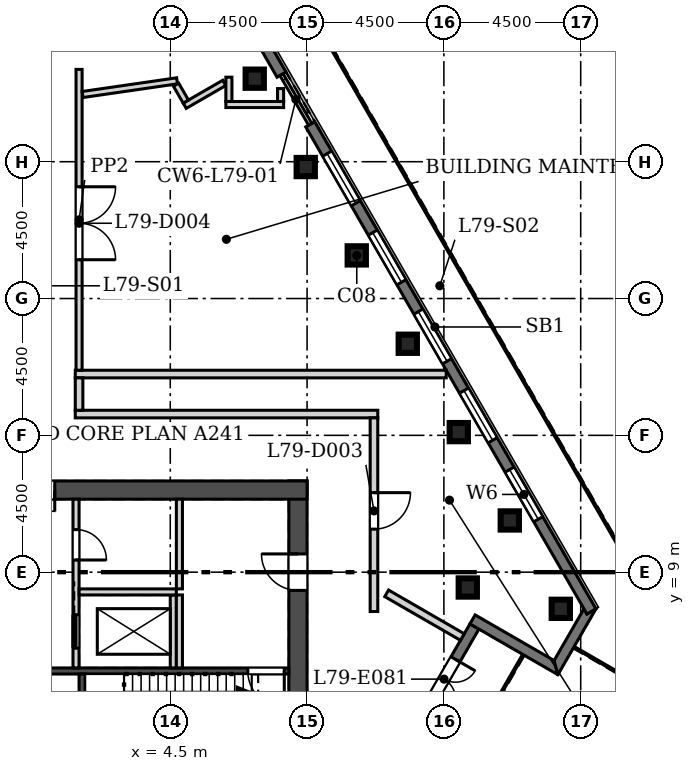
"""IFC4 building model, lengths in metres.
Left out: names, types, materials, properties, quantities, classifications, styles, units other than length and angle.
Written with IfcOpenShell. Run it as: python <this file> out.ifc"""

import sys

from ifc_helpers import new_model, si_unit, direction, frame, frame_2d, origin, origin_2d, place, context, subcontext, project, spatial, polyline, rectangle, hollow_rectangle, outline, extrude, element, fill, save


model = new_model("IFC4")
c1 = context("Model", 3, precision=1e-05, world=origin(), true_north=direction((0.0, 1.0)))
c2 = subcontext(c1, "Body", "Model", "MODEL_VIEW")
j1 = project(units=[si_unit("LENGTHUNIT", "METRE"), si_unit("PLANEANGLEUNIT", "RADIAN")], contexts=[c1])
p1 = place(None, origin())
s1 = spatial("IfcSite", under=j1, at=p1, CompositionType="ELEMENT")
p2 = place(p1, origin())
s2 = spatial("IfcBuilding", under=s1, at=p2, CompositionType="ELEMENT")
p3 = place(p2, frame((0.0, 0.0, 350.1)))
s3 = spatial("IfcBuildingStorey", under=s2, at=p3, CompositionType="ELEMENT", Elevation=350.1)
for number, where, z_axis, x_axis in (
    (1, (14.286, 8.495, 0.0), (0.0, 0.0, 1.0), (1.0, 0.0, 0.0)),
    (2, (17.345, 7.794, 0.0), (0.0, 0.0, 1.0), (1.0, 0.0, 0.0)),
    (3, (15.667, 10.7, 0.0), (0.0, 0.0, 1.0), (1.0, 0.0, 0.0)),
    (4, (13.99, 13.606, 0.0), (0.0, 0.0, 1.0), (1.0, 0.0, 0.0)),
    (5, (12.312, 16.512, 0.0), (0.0, 0.0, 1.0), (1.0, 0.0, 0.0)),
    (6, (10.634, 19.419, 0.0), (0.0, 0.0, 1.0), (1.0, 0.0, 0.0)),
    (7, (8.956, 22.325, 0.0), (0.0, 0.0, 1.0), (1.0, 0.0, 0.0)),
    (8, (7.278, 25.231, 0.0), (0.0, 0.0, 1.0), (1.0, 0.0, 0.0)),
):
    element("IfcColumn", number, at=place(p3, frame(where, z_axis=z_axis, x_axis=x_axis)), inside=s3, PredefinedType="COLUMN", context=c2, shape_type="SweptSolid", body=[
        extrude(hollow_rectangle(XDim=0.6, YDim=0.6, WallThickness=0.03, at=origin_2d()), origin(), (0.0, 0.0, 1.0), 4.4),
    ])
p4 = place(p3, frame((8.7, 0.85, 0.0), z_axis=(0.0, 0.0, 1.0), x_axis=(0.0, 1.0, 0.0)))
e9 = element("IfcWall", 9, at=p4, inside=s3, PredefinedType="SHEAR", context=c2, shape_type="SweptSolid", body=[
    extrude(rectangle(XDim=11.15, YDim=0.6, at=frame_2d((5.575, 0.0))), origin(), (0.0, 0.0, 1.0), 5.0),
])
p5 = place(p4, frame((7.55, 0.0, 0.0)))
e10 = element("IfcOpeningElement", 10, at=p5, cuts=e9, PredefinedType="OPENING", context=c2, shape_type="SweptSolid", body=[
    extrude(rectangle(XDim=1.2, YDim=2.1, at=frame_2d((0.6, 1.05))), frame((0.0, 0.31, 0.0), z_axis=(0.0, -1.0, 0.0), x_axis=(1.0, 0.0, 0.0)), (0.0, 0.0, 1.0), 0.62),
])
p6 = place(p3, frame((9.0, 11.7, 0.0), z_axis=(0.0, 0.0, 1.0), x_axis=(-1.0, 0.0, 0.0)))
e11 = element("IfcWall", 11, at=p6, inside=s3, PredefinedType="SHEAR", context=c2, shape_type="SweptSolid", body=[
    extrude(rectangle(XDim=18.0, YDim=0.6, at=frame_2d((9.0, 0.0))), origin(), (0.0, 0.0, 1.0), 5.0),
])
p7 = place(p6, frame((8.3, 0.0, 0.0)))
e12 = element("IfcOpeningElement", 12, at=p7, cuts=e11, PredefinedType="OPENING", context=c2, shape_type="SweptSolid", body=[
    extrude(rectangle(XDim=1.4, YDim=2.1, at=frame_2d((0.7, 1.05))), frame((0.0, 0.31, 0.0), z_axis=(0.0, -1.0, 0.0), x_axis=(1.0, 0.0, 0.0)), (0.0, 0.0, 1.0), 0.62),
])
p8 = place(p3, frame((12.505, 3.75, 0.0), z_axis=(0.0, 0.0, 1.0), x_axis=(0.49999894854, 0.866026010844, 0.0)))
e13 = element("IfcWall", 13, at=p8, inside=s3, PredefinedType="SOLIDWALL", context=c2, shape_type="SweptSolid", body=[
    extrude(rectangle(XDim=4.0, YDim=0.34, at=frame_2d((2.0, 0.0))), origin(), (0.0, 0.0, 1.0), 4.4),
])
p9 = place(p8, frame((1.25, 0.0, 0.0)))
e14 = element("IfcOpeningElement", 14, at=p9, cuts=e13, PredefinedType="OPENING", context=c2, shape_type="SweptSolid", body=[
    extrude(rectangle(XDim=1.5, YDim=2.4, at=frame_2d((0.75, 1.2))), frame((0.0, 0.18, 0.0), z_axis=(0.0, -1.0, 0.0), x_axis=(1.0, 0.0, 0.0)), (0.0, 0.0, 1.0), 0.36),
])
p10 = place(p3, origin())
e15 = element("IfcWall", 15, at=p10, inside=s3, PredefinedType="SOLIDWALL", context=c2, shape_type="SweptSolid", body=[
    extrude(outline(polyline([(17.25, 5.628), (14.652, 7.129), (14.357, 7.299), (14.527, 7.594), (17.126, 6.094), (17.251, 5.628), (17.25, 5.628)])), origin(), (0.0, 0.0, 1.0), 4.4),
])
p11 = place(p3, origin())
e16 = element("IfcWall", 16, at=p11, inside=s3, PredefinedType="SOLIDWALL", context=c2, shape_type="SweptSolid", body=[
    extrude(outline(polyline([(18.107, 7.795), (18.206, 7.625), (18.501, 7.795), (18.501, 7.795), (17.25, 5.628), (17.25, 5.628), (17.125, 6.094), (18.107, 7.795)])), origin(), (0.0, 0.0, 1.0), 4.4),
])
p12 = place(p3, frame((18.353, 7.709, 0.0), z_axis=(0.0, 0.0, 1.0), x_axis=(-0.499999662836, 0.866025598446, 0.0)))
e17 = element("IfcWall", 17, at=p12, inside=s3, PredefinedType="SOLIDWALL", context=c2, shape_type="SweptSolid", body=[
    extrude(rectangle(XDim=18.5, YDim=0.34, at=frame_2d((9.25, 0.0))), origin(), (0.0, 0.0, 1.0), 4.4),
])
p13 = place(p12, frame((3.5, 0.0, 0.9)))
e18 = element("IfcOpeningElement", 18, at=p13, cuts=e17, PredefinedType="OPENING", context=c2, shape_type="SweptSolid", body=[
    extrude(rectangle(XDim=1.885, YDim=3.0, at=frame_2d((0.942, 1.5))), frame((0.0, 0.18, 0.0), z_axis=(0.0, -1.0, 0.0), x_axis=(1.0, 0.0, 0.0)), (0.0, 0.0, 1.0), 0.36),
])
p14 = place(p12, frame((6.5, 0.0, 0.9)))
e19 = element("IfcOpeningElement", 19, at=p14, cuts=e17, PredefinedType="OPENING", context=c2, shape_type="SweptSolid", body=[
    extrude(rectangle(XDim=1.885, YDim=3.0, at=frame_2d((0.942, 1.5))), frame((0.0, 0.18, 0.0), z_axis=(0.0, -1.0, 0.0), x_axis=(1.0, 0.0, 0.0)), (0.0, 0.0, 1.0), 0.36),
])
p15 = place(p12, frame((9.5, 0.0, 0.9)))
e20 = element("IfcOpeningElement", 20, at=p15, cuts=e17, PredefinedType="OPENING", context=c2, shape_type="SweptSolid", body=[
    extrude(rectangle(XDim=1.885, YDim=3.0, at=frame_2d((0.942, 1.5))), frame((0.0, 0.18, 0.0), z_axis=(0.0, -1.0, 0.0), x_axis=(1.0, 0.0, 0.0)), (0.0, 0.0, 1.0), 0.36),
])
p16 = place(p12, frame((12.5, 0.0, 0.9)))
e21 = element("IfcOpeningElement", 21, at=p16, cuts=e17, PredefinedType="OPENING", context=c2, shape_type="SweptSolid", body=[
    extrude(rectangle(XDim=1.885, YDim=3.0, at=frame_2d((0.942, 1.5))), frame((0.0, 0.18, 0.0), z_axis=(0.0, -1.0, 0.0), x_axis=(1.0, 0.0, 0.0)), (0.0, 0.0, 1.0), 0.36),
])
p17 = place(p12, frame((15.5, 0.0, 0.9)))
e22 = element("IfcOpeningElement", 22, at=p17, cuts=e17, PredefinedType="OPENING", context=c2, shape_type="SweptSolid", body=[
    extrude(rectangle(XDim=1.885, YDim=3.0, at=frame_2d((0.942, 1.5))), frame((0.0, 0.18, 0.0), z_axis=(0.0, -1.0, 0.0), x_axis=(1.0, 0.0, 0.0)), (0.0, 0.0, 1.0), 0.36),
])
p18 = place(p3, frame((8.16, 25.363, 0.0), z_axis=(0.0, 0.0, 1.0), x_axis=(-0.500044296292, 0.865999827798, 0.0)))
e23 = element("IfcWall", 23, at=p18, inside=s3, PredefinedType="SOLIDWALL", context=c2, shape_type="SweptSolid", body=[
    extrude(rectangle(XDim=4.115, YDim=0.34, at=frame_2d((2.058, 0.0))), origin(), (0.0, 0.0, 1.0), 4.4),
])
p19 = place(p18, frame((1.115, 0.0, 0.0)))
e24 = element("IfcOpeningElement", 24, at=p19, cuts=e23, PredefinedType="OPENING", context=c2, shape_type="SweptSolid", body=[
    extrude(rectangle(XDim=1.885, YDim=2.6, at=frame_2d((0.942, 1.3))), frame((0.0, 0.18, 0.0), z_axis=(0.0, -1.0, 0.0), x_axis=(1.0, 0.0, 0.0)), (0.0, 0.0, 1.0), 0.36),
])
p20 = place(p3, frame((-8.4, 5.75, -0.6), z_axis=(0.0, 0.0, 1.0), x_axis=(1.0, 0.0, 0.0)))
e25 = element("IfcWall", 25, at=p20, inside=s3, PredefinedType="SOLIDWALL", context=c2, shape_type="SweptSolid", body=[
    extrude(rectangle(XDim=16.8, YDim=0.2, at=frame_2d((8.4, 0.0))), origin(), (0.0, 0.0, 1.0), 5.0),
])
p21 = place(p20, frame((7.9, 0.0, 0.6)))
e26 = element("IfcOpeningElement", 26, at=p21, cuts=e25, PredefinedType="OPENING", context=c2, shape_type="SweptSolid", body=[
    extrude(rectangle(XDim=1.0, YDim=2.1, at=frame_2d((0.5, 1.05))), frame((0.0, 0.11, 0.0), z_axis=(0.0, -1.0, 0.0), x_axis=(1.0, 0.0, 0.0)), (0.0, 0.0, 1.0), 0.22),
])
p22 = place(p20, frame((0.15, 0.0, 0.6)))
e27 = element("IfcOpeningElement", 27, at=p22, cuts=e25, PredefinedType="OPENING", context=c2, shape_type="SweptSolid", body=[
    extrude(rectangle(XDim=1.2, YDim=2.1, at=frame_2d((0.6, 1.05))), frame((0.0, 0.11, 0.0), z_axis=(0.0, -1.0, 0.0), x_axis=(1.0, 0.0, 0.0)), (0.0, 0.0, 1.0), 0.22),
])
p23 = place(p20, frame((15.45, 0.0, 0.6)))
e28 = element("IfcOpeningElement", 28, at=p23, cuts=e25, PredefinedType="OPENING", context=c2, shape_type="SweptSolid", body=[
    extrude(rectangle(XDim=1.2, YDim=2.1, at=frame_2d((0.6, 1.05))), frame((0.0, 0.11, 0.0), z_axis=(0.0, -1.0, 0.0), x_axis=(1.0, 0.0, 0.0)), (0.0, 0.0, 1.0), 0.22),
])
p24 = place(p3, frame((1.6, 1.45, -0.6), z_axis=(0.0, 0.0, 1.0), x_axis=(0.0, 1.0, 0.0)))
e29 = element("IfcWall", 29, at=p24, inside=s3, PredefinedType="SOLIDWALL", context=c2, shape_type="SweptSolid", body=[
    extrude(rectangle(XDim=4.2, YDim=0.2, at=frame_2d((2.1, 0.0))), origin(), (0.0, 0.0, 1.0), 5.0),
])
p25 = place(p3, frame((1.4, 5.85, 0.0), z_axis=(0.0, 0.0, 1.0), x_axis=(0.0, 1.0, 0.0)))
e30 = element("IfcWall", 30, at=p25, inside=s3, PredefinedType="SOLIDWALL", context=c2, shape_type="SweptSolid", body=[
    extrude(rectangle(XDim=5.55, YDim=0.2, at=frame_2d((2.775, 0.0))), origin(), (0.0, 0.0, 1.0), 4.4),
])
p26 = place(p25, frame((0.65, 0.0, 0.0)))
e31 = element("IfcOpeningElement", 31, at=p26, cuts=e30, PredefinedType="OPENING", context=c2, shape_type="SweptSolid", body=[
    extrude(rectangle(XDim=1.1, YDim=2.1, at=frame_2d((0.55, 1.05))), frame((0.0, 0.11, 0.0), z_axis=(0.0, -1.0, 0.0), x_axis=(1.0, 0.0, 0.0)), (0.0, 0.0, 1.0), 0.22),
])
p27 = place(p25, frame((3.55, 0.0, 0.0)))
e32 = element("IfcOpeningElement", 32, at=p27, cuts=e30, PredefinedType="OPENING", context=c2, shape_type="SweptSolid", body=[
    extrude(rectangle(XDim=1.0, YDim=2.1, at=frame_2d((0.5, 1.05))), frame((0.0, 0.11, 0.0), z_axis=(0.0, -1.0, 0.0), x_axis=(1.0, 0.0, 0.0)), (0.0, 0.0, 1.0), 0.22),
])
p28 = place(p3, frame((4.6, 5.85, 0.0), z_axis=(0.0, 0.0, 1.0), x_axis=(0.0, 1.0, 0.0)))
e33 = element("IfcWall", 33, at=p28, inside=s3, PredefinedType="SOLIDWALL", context=c2, shape_type="SweptSolid", body=[
    extrude(rectangle(XDim=2.4, YDim=0.2, at=frame_2d((1.2, 0.0))), origin(), (0.0, 0.0, 1.0), 4.4),
])
p29 = place(p3, frame((1.5, 8.35, 0.0), z_axis=(0.0, 0.0, 1.0), x_axis=(1.0, 0.0, 0.0)))
e34 = element("IfcWall", 34, at=p29, inside=s3, PredefinedType="SOLIDWALL", context=c2, shape_type="SweptSolid", body=[
    extrude(rectangle(XDim=3.2, YDim=0.2, at=frame_2d((1.6, 0.0))), origin(), (0.0, 0.0, 1.0), 4.4),
])
p30 = place(p3, frame((4.8, 8.45, 0.0), z_axis=(0.0, 0.0, 1.0), x_axis=(0.0, 1.0, 0.0)))
e35 = element("IfcWall", 35, at=p30, inside=s3, PredefinedType="SOLIDWALL", context=c2, shape_type="SweptSolid", body=[
    extrude(rectangle(XDim=2.95, YDim=0.2, at=frame_2d((1.475, 0.0))), origin(), (0.0, 0.0, 1.0), 4.4),
])
p31 = place(p3, frame((4.8, 5.85, 0.0), z_axis=(0.0, 0.0, 1.0), x_axis=(0.0, 1.0, 0.0)))
e36 = element("IfcWall", 36, at=p31, inside=s3, PredefinedType="SOLIDWALL", context=c2, shape_type="SweptSolid", body=[
    extrude(rectangle(XDim=2.4, YDim=0.2, at=frame_2d((1.2, 0.0))), origin(), (0.0, 0.0, 1.0), 4.4),
])
p32 = place(p3, frame((1.375, 15.516, 0.0), z_axis=(0.0, 0.0, 1.0), x_axis=(1.0, 0.0, 0.0)))
e37 = element("IfcWall", 37, at=p32, inside=s3, PredefinedType="SOLIDWALL", context=c2, shape_type="SweptSolid", body=[
    extrude(rectangle(XDim=12.202, YDim=0.25, at=frame_2d((6.101, 0.0))), origin(), (0.0, 0.0, 1.0), 4.4),
])
p33 = place(p3, frame((1.375, 14.2, 0.0), z_axis=(0.0, 0.0, 1.0), x_axis=(1.0, 0.0, 0.0)))
e38 = element("IfcWall", 38, at=p33, inside=s3, PredefinedType="SOLIDWALL", context=c2, shape_type="SweptSolid", body=[
    extrude(rectangle(XDim=9.95, YDim=0.25, at=frame_2d((4.975, 0.0))), origin(), (0.0, 0.0, 1.0), 4.4),
])
p34 = place(p3, frame((1.5, 25.536, 0.0), z_axis=(0.0, 0.0, 1.0), x_axis=(0.0, -1.0, 0.0)))
e39 = element("IfcWall", 39, at=p34, inside=s3, PredefinedType="PARTITIONING", context=c2, shape_type="SweptSolid", body=[
    extrude(rectangle(XDim=9.895, YDim=0.2, at=frame_2d((4.947, 0.0))), origin(), (0.0, 0.0, 1.0), 4.4),
])
p35 = place(p34, frame((3.86, 0.0, 0.0)))
e40 = element("IfcOpeningElement", 40, at=p35, cuts=e39, PredefinedType="OPENING", context=c2, shape_type="SweptSolid", body=[
    extrude(rectangle(XDim=2.4, YDim=2.4, at=frame_2d((1.2, 1.2))), frame((0.0, 0.11, 0.0), z_axis=(0.0, -1.0, 0.0), x_axis=(1.0, 0.0, 0.0)), (0.0, 0.0, 1.0), 0.22),
])
p36 = place(p3, frame((11.2, 14.075, 0.0), z_axis=(0.0, 0.0, 1.0), x_axis=(0.0, -1.0, 0.0)))
e41 = element("IfcWall", 41, at=p36, inside=s3, PredefinedType="SOLIDWALL", context=c2, shape_type="SweptSolid", body=[
    extrude(rectangle(XDim=6.37, YDim=0.25, at=frame_2d((3.185, 0.0))), origin(), (0.0, 0.0, 1.0), 4.4),
])
p37 = place(p36, frame((2.46, 0.0, 0.0)))
e42 = element("IfcOpeningElement", 42, at=p37, cuts=e41, PredefinedType="OPENING", context=c2, shape_type="SweptSolid", body=[
    extrude(rectangle(XDim=1.2, YDim=2.1, at=frame_2d((0.6, 1.05))), frame((0.0, 0.135, 0.0), z_axis=(0.0, -1.0, 0.0), x_axis=(1.0, 0.0, 0.0)), (0.0, 0.0, 1.0), 0.27),
])
p38 = place(p3, frame((4.724, 25.16, 0.0), z_axis=(0.0, 0.0, 1.0), x_axis=(-0.989677370755, -0.143313299509, 0.0)))
e43 = element("IfcWall", 43, at=p38, inside=s3, PredefinedType="PARTITIONING", context=c2, shape_type="SweptSolid", body=[
    extrude(rectangle(XDim=3.143, YDim=0.2, at=frame_2d((1.572, 0.0))), origin(), (0.0, 0.0, 1.0), 4.4),
])
p39 = place(p3, frame((11.618, 8.304, 0.0), z_axis=(0.0, 0.0, 1.0), x_axis=(0.866018712932, -0.500011588718, 0.0)))
e44 = element("IfcWall", 44, at=p39, inside=s3, PredefinedType="SOLIDWALL", context=c2, shape_type="SweptSolid", body=[
    extrude(rectangle(XDim=2.875, YDim=0.25, at=frame_2d((1.438, 0.0))), origin(), (0.0, 0.0, 1.0), 4.4),
])
p40 = place(p3, frame((8.228, 24.381, 0.0), z_axis=(0.0, 0.0, 1.0), x_axis=(-1.0, 0.0, 0.0)))
e45 = element("IfcWall", 45, at=p40, inside=s3, PredefinedType="PARTITIONING", context=c2, shape_type="SweptSolid", body=[
    extrude(rectangle(XDim=1.9, YDim=0.2, at=frame_2d((0.95, 0.0))), origin(), (0.0, 0.0, 1.0), 4.4),
])
p41 = place(p3, frame((6.276, 25.092, 0.0), z_axis=(0.0, 0.0, 1.0), x_axis=(-0.865974529972, -0.500088105676, 0.0)))
e46 = element("IfcWall", 46, at=p41, inside=s3, PredefinedType="PARTITIONING", context=c2, shape_type="SweptSolid", body=[
    extrude(rectangle(XDim=1.503, YDim=0.2, at=frame_2d((0.751, 0.0))), origin(), (0.0, 0.0, 1.0), 4.4),
])
p42 = place(p3, frame((1.5, 15.391, 0.0), z_axis=(0.0, 0.0, 1.0), x_axis=(0.0, -1.0, 0.0)))
e47 = element("IfcWall", 47, at=p42, inside=s3, PredefinedType="SOLIDWALL", context=c2, shape_type="SweptSolid", body=[
    extrude(rectangle(XDim=1.066, YDim=0.25, at=frame_2d((0.533, 0.0))), origin(), (0.0, 0.0, 1.0), 4.4),
])
p43 = place(p3, frame((6.428, 24.481, 0.0), z_axis=(0.0, 0.0, 1.0), x_axis=(0.0, 1.0, 0.0)))
e48 = element("IfcWall", 48, at=p43, inside=s3, PredefinedType="PARTITIONING", context=c2, shape_type="SweptSolid", body=[
    extrude(rectangle(XDim=0.8, YDim=0.2, at=frame_2d((0.4, 0.0))), origin(), (0.0, 0.0, 1.0), 4.4),
])
p44 = place(p3, frame((5.011, 24.477, 0.0), z_axis=(0.0, 0.0, 1.0), x_axis=(-0.50006233641, 0.86598941085, 0.0)))
e49 = element("IfcWall", 49, at=p44, inside=s3, PredefinedType="PARTITIONING", context=c2, shape_type="SweptSolid", body=[
    extrude(rectangle(XDim=0.643, YDim=0.2, at=frame_2d((0.321, 0.0))), origin(), (0.0, 0.0, 1.0), 4.4),
])
p45 = place(p3, frame((8.128, 24.905, 0.0), z_axis=(0.0, 0.0, 1.0), x_axis=(0.0, -1.0, 0.0)))
e50 = element("IfcWall", 50, at=p45, inside=s3, PredefinedType="PARTITIONING", context=c2, shape_type="SweptSolid", body=[
    extrude(rectangle(XDim=0.424, YDim=0.2, at=frame_2d((0.212, 0.0))), origin(), (0.0, 0.0, 1.0), 4.4),
])
p46 = place(p9, frame((1.5, 0.0, 0.0), z_axis=(0.0, 0.0, 1.0), x_axis=(-1.0, 0.0, 0.0)))
e51 = element("IfcDoor", 51, at=p46, inside=s3, OperationType="DOUBLE_DOOR_SINGLE_SWING", PredefinedType="DOOR", context=c2, shape_type="SweptSolid", body=[
    extrude(rectangle(XDim=1.5, YDim=2.4, at=frame_2d((0.75, 1.2))), frame((0.0, 0.025, 0.0), z_axis=(0.0, -1.0, 0.0), x_axis=(1.0, 0.0, 0.0)), (0.0, 0.0, 1.0), 0.05),
])
fill(e14, e51)
p47 = place(p13, origin())
e52 = element("IfcWindow", 52, at=p47, inside=s3, PartitioningType="SINGLE_PANEL", PredefinedType="WINDOW", context=c2, shape_type="SweptSolid", body=[
    extrude(rectangle(XDim=1.885, YDim=3.0, at=frame_2d((0.942, 1.5))), frame((0.0, 0.11, 0.0), z_axis=(0.0, -1.0, 0.0), x_axis=(1.0, 0.0, 0.0)), (0.0, 0.0, 1.0), 0.06),
])
fill(e18, e52)
p48 = place(p14, origin())
e53 = element("IfcWindow", 53, at=p48, inside=s3, PartitioningType="SINGLE_PANEL", PredefinedType="WINDOW", context=c2, shape_type="SweptSolid", body=[
    extrude(rectangle(XDim=1.885, YDim=3.0, at=frame_2d((0.942, 1.5))), frame((0.0, 0.11, 0.0), z_axis=(0.0, -1.0, 0.0), x_axis=(1.0, 0.0, 0.0)), (0.0, 0.0, 1.0), 0.06),
])
fill(e19, e53)
p49 = place(p15, origin())
e54 = element("IfcWindow", 54, at=p49, inside=s3, PartitioningType="SINGLE_PANEL", PredefinedType="WINDOW", context=c2, shape_type="SweptSolid", body=[
    extrude(rectangle(XDim=1.885, YDim=3.0, at=frame_2d((0.942, 1.5))), frame((0.0, 0.11, 0.0), z_axis=(0.0, -1.0, 0.0), x_axis=(1.0, 0.0, 0.0)), (0.0, 0.0, 1.0), 0.06),
])
fill(e20, e54)
p50 = place(p16, origin())
e55 = element("IfcWindow", 55, at=p50, inside=s3, PartitioningType="SINGLE_PANEL", PredefinedType="WINDOW", context=c2, shape_type="SweptSolid", body=[
    extrude(rectangle(XDim=1.885, YDim=3.0, at=frame_2d((0.942, 1.5))), frame((0.0, 0.11, 0.0), z_axis=(0.0, -1.0, 0.0), x_axis=(1.0, 0.0, 0.0)), (0.0, 0.0, 1.0), 0.06),
])
fill(e21, e55)
p51 = place(p17, origin())
e56 = element("IfcWindow", 56, at=p51, inside=s3, PartitioningType="SINGLE_PANEL", PredefinedType="WINDOW", context=c2, shape_type="SweptSolid", body=[
    extrude(rectangle(XDim=1.885, YDim=3.0, at=frame_2d((0.942, 1.5))), frame((0.0, 0.11, 0.0), z_axis=(0.0, -1.0, 0.0), x_axis=(1.0, 0.0, 0.0)), (0.0, 0.0, 1.0), 0.06),
])
fill(e22, e56)
p52 = place(p26, origin())
e57 = element("IfcDoor", 57, at=p52, inside=s3, OperationType="SLIDING_TO_RIGHT", PredefinedType="DOOR", context=c2, shape_type="SweptSolid", body=[
    extrude(rectangle(XDim=1.1, YDim=2.1, at=frame_2d((0.55, 1.05))), frame((0.0, 0.025, 0.0), z_axis=(0.0, -1.0, 0.0), x_axis=(1.0, 0.0, 0.0)), (0.0, 0.0, 1.0), 0.05),
])
fill(e31, e57)
p53 = place(p5, origin())
e58 = element("IfcDoor", 58, at=p53, inside=s3, OperationType="SINGLE_SWING_RIGHT", PredefinedType="DOOR", context=c2, shape_type="SweptSolid", body=[
    extrude(rectangle(XDim=1.2, YDim=2.1, at=frame_2d((0.6, 1.05))), frame((0.0, 0.025, 0.0), z_axis=(0.0, -1.0, 0.0), x_axis=(1.0, 0.0, 0.0)), (0.0, 0.0, 1.0), 0.05),
])
fill(e10, e58)
p54 = place(p23, frame((1.2, 0.0, 0.0), z_axis=(0.0, 0.0, 1.0), x_axis=(-1.0, 0.0, 0.0)))
e59 = element("IfcDoor", 59, at=p54, inside=s3, OperationType="SINGLE_SWING_LEFT", PredefinedType="DOOR", context=c2, shape_type="SweptSolid", body=[
    extrude(rectangle(XDim=1.2, YDim=2.1, at=frame_2d((0.6, 1.05))), frame((0.0, 0.025, 0.0), z_axis=(0.0, -1.0, 0.0), x_axis=(1.0, 0.0, 0.0)), (0.0, 0.0, 1.0), 0.05),
])
fill(e28, e59)
p55 = place(p27, frame((1.0, 0.0, 0.0), z_axis=(0.0, 0.0, 1.0), x_axis=(-1.0, 0.0, 0.0)))
e60 = element("IfcDoor", 60, at=p55, inside=s3, OperationType="SINGLE_SWING_RIGHT", PredefinedType="DOOR", context=c2, shape_type="SweptSolid", body=[
    extrude(rectangle(XDim=1.0, YDim=2.1, at=frame_2d((0.5, 1.05))), frame((0.0, 0.025, 0.0), z_axis=(0.0, -1.0, 0.0), x_axis=(1.0, 0.0, 0.0)), (0.0, 0.0, 1.0), 0.05),
])
fill(e32, e60)
p56 = place(p7, origin())
e61 = element("IfcDoor", 61, at=p56, inside=s3, OperationType="DOUBLE_DOOR_SINGLE_SWING", PredefinedType="DOOR", context=c2, shape_type="SweptSolid", body=[
    extrude(rectangle(XDim=1.4, YDim=2.1, at=frame_2d((0.7, 1.05))), frame((0.0, 0.025, 0.0), z_axis=(0.0, -1.0, 0.0), x_axis=(1.0, 0.0, 0.0)), (0.0, 0.0, 1.0), 0.05),
])
fill(e12, e61)
p57 = place(p37, origin())
e62 = element("IfcDoor", 62, at=p57, inside=s3, OperationType="SINGLE_SWING_LEFT", PredefinedType="DOOR", context=c2, shape_type="SweptSolid", body=[
    extrude(rectangle(XDim=1.2, YDim=2.1, at=frame_2d((0.6, 1.05))), frame((0.0, 0.025, 0.0), z_axis=(0.0, -1.0, 0.0), x_axis=(1.0, 0.0, 0.0)), (0.0, 0.0, 1.0), 0.05),
])
fill(e42, e62)
p58 = place(p35, origin())
e63 = element("IfcDoor", 63, at=p58, inside=s3, OperationType="DOUBLE_DOOR_SINGLE_SWING", PredefinedType="DOOR", context=c2, shape_type="SweptSolid", body=[
    extrude(rectangle(XDim=2.4, YDim=2.4, at=frame_2d((1.2, 1.2))), frame((0.0, 0.025, 0.0), z_axis=(0.0, -1.0, 0.0), x_axis=(1.0, 0.0, 0.0)), (0.0, 0.0, 1.0), 0.05),
])
fill(e40, e63)
save(model, sys.argv[1])
